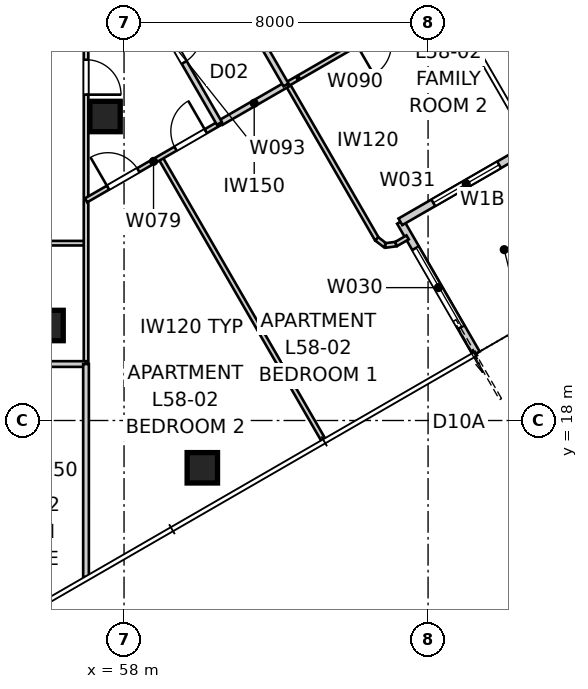
"""IFC4 building model, lengths in metres.
Left out: names, types, materials, properties, quantities, classifications, styles, units other than length and angle.
Written with IfcOpenShell. Run it as: python <this file> out.ifc"""

import sys

from ifc_helpers import new_model, si_unit, direction, frame, frame_2d, origin, origin_2d, place, context, subcontext, project, spatial, rectangle, extrude, element, fill, save


model = new_model("IFC4")
c1 = context("Model", 3, precision=1e-05, world=origin(), true_north=direction((0.0, 1.0)))
c2 = subcontext(c1, "Body", "Model", "MODEL_VIEW")
j1 = project(units=[si_unit("LENGTHUNIT", "METRE"), si_unit("PLANEANGLEUNIT", "RADIAN")], contexts=[c1])
p1 = place(None, origin())
s1 = spatial("IfcSite", under=j1, at=p1, CompositionType="ELEMENT")
p2 = place(p1, origin())
s2 = spatial("IfcBuilding", under=s1, at=p2, CompositionType="ELEMENT")
p3 = place(p2, frame((0.0, 0.0, 211.6)))
s3 = spatial("IfcBuildingStorey", under=s2, at=p3, CompositionType="ELEMENT", Elevation=211.6)
for number, where, z_axis, x_axis in (
    (1, (60.06, 16.755, 0.0), (0.0, 0.0, 1.0), (1.0, 0.0, 0.0)),
    (2, (57.5, 26.0, 0.0), (0.0, 0.0, 1.0), (1.0, 0.0, 0.0)),
    (3, (56.0, 20.5, 0.0), (0.0, 0.0, 1.0), (1.0, 0.0, 0.0)),
):
    element("IfcColumn", number, at=place(p3, frame(where, z_axis=z_axis, x_axis=x_axis)), inside=s3, PredefinedType="COLUMN", context=c2, shape_type="SweptSolid", body=[
        extrude(rectangle(XDim=0.8, YDim=0.8, at=origin_2d()), origin(), (0.0, 0.0, 1.0), 3.4),
    ])
p4 = place(p3, frame((67.271, 19.764, 0.0), z_axis=(0.0, 0.0, 1.0), x_axis=(-0.49999894854, 0.866026010844, 0.0)))
e4 = element("IfcWall", 4, at=p4, inside=s3, PredefinedType="SOLIDWALL", context=c2, shape_type="SweptSolid", body=[
    extrude(rectangle(XDim=4.0, YDim=0.2, at=frame_2d((2.0, 0.0))), origin(), (0.0, 0.0, 1.0), 3.25),
])
p5 = place(p4, frame((0.8, 0.0, 0.0)))
e5 = element("IfcOpeningElement", 5, at=p5, cuts=e4, PredefinedType="OPENING", context=c2, shape_type="SweptSolid", body=[
    extrude(rectangle(XDim=2.4, YDim=2.1, at=frame_2d((1.2, 1.05))), frame((0.0, 0.11, 0.0), z_axis=(0.0, -1.0, 0.0), x_axis=(1.0, 0.0, 0.0)), (0.0, 0.0, 1.0), 0.22),
])
p6 = place(p3, frame((65.271, 23.229, 0.0), z_axis=(0.0, 0.0, 1.0), x_axis=(0.866026010844, 0.49999894854, 0.0)))
e6 = element("IfcWall", 6, at=p6, inside=s3, PredefinedType="SOLIDWALL", context=c2, shape_type="SweptSolid", body=[
    extrude(rectangle(XDim=4.0, YDim=0.2, at=frame_2d((2.0, 0.0))), origin(), (0.0, 0.0, 1.0), 3.25),
])
p7 = place(p6, frame((1.0, 0.0, 0.45)))
e7 = element("IfcOpeningElement", 7, at=p7, cuts=e6, PredefinedType="OPENING", context=c2, shape_type="SweptSolid", body=[
    extrude(rectangle(XDim=2.0, YDim=1.8, at=frame_2d((1.0, 0.9))), frame((0.0, 0.11, 0.0), z_axis=(0.0, -1.0, 0.0), x_axis=(1.0, 0.0, 0.0)), (0.0, 0.0, 1.0), 0.22),
])
p8 = place(p3, frame((64.111, 33.239, 0.0), z_axis=(0.0, 0.0, 1.0), x_axis=(-0.866024069551, -0.500002310952, 0.0)))
e8 = element("IfcWall", 8, at=p8, inside=s3, PredefinedType="PARTITIONING", context=c2, shape_type="SweptSolid", body=[
    extrude(rectangle(XDim=10.95, YDim=0.25, at=frame_2d((5.475, 0.0))), origin(), (0.0, 0.0, 1.0), 3.25),
])
p9 = place(p3, frame((57.0, 22.667, 0.0), z_axis=(0.0, 0.0, 1.0), x_axis=(-1.0, 0.0, 0.0)))
e9 = element("IfcWall", 9, at=p9, inside=s3, PredefinedType="PARTITIONING", context=c2, shape_type="SweptSolid", body=[
    extrude(rectangle(XDim=4.9, YDim=0.12, at=frame_2d((2.45, 0.0))), origin(), (0.0, 0.0, 1.0), 3.25),
])
p10 = place(p9, frame((1.866, 0.0, 0.0)))
e10 = element("IfcOpeningElement", 10, at=p10, cuts=e9, PredefinedType="OPENING", context=c2, shape_type="SweptSolid", body=[
    extrude(rectangle(XDim=0.92, YDim=2.34, at=frame_2d((0.46, 1.17))), frame((0.0, 0.07, 0.0), z_axis=(0.0, -1.0, 0.0), x_axis=(1.0, 0.0, 0.0)), (0.0, 0.0, 1.0), 0.14),
])
p11 = place(p3, frame((57.0, 42.676, 0.0), z_axis=(0.0, 0.0, 1.0), x_axis=(0.0, -1.0, 0.0)))
e11 = element("IfcWall", 11, at=p11, inside=s3, PredefinedType="PARTITIONING", context=c2, shape_type="SweptSolid", body=[
    extrude(rectangle(XDim=23.19, YDim=0.12, at=frame_2d((11.595, 0.0))), origin(), (0.0, 0.0, 1.0), 2.55),
])
p12 = place(p11, frame((11.03, 0.0, 0.0)))
e12 = element("IfcOpeningElement", 12, at=p12, cuts=e11, PredefinedType="OPENING", context=c2, shape_type="SweptSolid", body=[
    extrude(rectangle(XDim=0.92, YDim=2.34, at=frame_2d((0.46, 1.17))), frame((0.0, 0.07, 0.0), z_axis=(0.0, -1.0, 0.0), x_axis=(1.0, 0.0, 0.0)), (0.0, 0.0, 1.0), 0.14),
])
p13 = place(p11, frame((15.181, 0.0, 0.0)))
e13 = element("IfcOpeningElement", 13, at=p13, cuts=e11, PredefinedType="OPENING", context=c2, shape_type="SweptSolid", body=[
    extrude(rectangle(XDim=0.92, YDim=2.34, at=frame_2d((0.46, 1.17))), frame((0.0, 0.07, 0.0), z_axis=(0.0, -1.0, 0.0), x_axis=(1.0, 0.0, 0.0)), (0.0, 0.0, 1.0), 0.14),
])
p14 = place(p3, frame((57.0, 19.486, 0.0), z_axis=(0.0, 0.0, 1.0), x_axis=(-1.0, 0.0, 0.0)))
e14 = element("IfcWall", 14, at=p14, inside=s3, PredefinedType="SOLIDWALL", context=c2, shape_type="SweptSolid", body=[
    extrude(rectangle(XDim=4.602, YDim=0.15, at=frame_2d((2.301, 0.0))), origin(), (0.0, 0.0, 1.0), 3.25),
])
p15 = place(p14, frame((1.841, 0.0, 0.0)))
e15 = element("IfcOpeningElement", 15, at=p15, cuts=e14, PredefinedType="OPENING", context=c2, shape_type="SweptSolid", body=[
    extrude(rectangle(XDim=0.92, YDim=2.1, at=frame_2d((0.46, 1.05))), frame((0.0, 0.085, 0.0), z_axis=(0.0, -1.0, 0.0), x_axis=(1.0, 0.0, 0.0)), (0.0, 0.0, 1.0), 0.17),
])
p16 = place(p3, frame((63.246, 17.487, 0.0), z_axis=(0.0, 0.0, 1.0), x_axis=(-0.49999898161, 0.866025991751, 0.0)))
e16 = element("IfcWall", 16, at=p16, inside=s3, PredefinedType="PARTITIONING", context=c2, shape_type="SweptSolid", body=[
    extrude(rectangle(XDim=8.585, YDim=0.12, at=frame_2d((4.292, 0.0))), origin(), (0.0, 0.0, 1.0), 3.25),
])
p17 = place(p3, frame((57.0, 23.793, 0.0), z_axis=(0.0, 0.0, 1.0), x_axis=(0.866007146345, 0.50003162148, 0.0)))
e17 = element("IfcWall", 17, at=p17, inside=s3, PredefinedType="PARTITIONING", context=c2, shape_type="SweptSolid", body=[
    extrude(rectangle(XDim=4.101, YDim=0.12, at=frame_2d((2.051, 0.0))), origin(), (0.0, 0.0, 1.0), 3.25),
])
p18 = place(p17, frame((0.668, 0.0, 0.0)))
e18 = element("IfcOpeningElement", 18, at=p18, cuts=e17, PredefinedType="OPENING", context=c2, shape_type="SweptSolid", body=[
    extrude(rectangle(XDim=0.92, YDim=2.34, at=frame_2d((0.46, 1.17))), frame((0.0, 0.07, 0.0), z_axis=(0.0, -1.0, 0.0), x_axis=(1.0, 0.0, 0.0)), (0.0, 0.0, 1.0), 0.14),
])
p19 = place(p17, frame((2.719, 0.0, 0.0)))
e19 = element("IfcOpeningElement", 19, at=p19, cuts=e17, PredefinedType="OPENING", context=c2, shape_type="SweptSolid", body=[
    extrude(rectangle(XDim=0.92, YDim=2.34, at=frame_2d((0.46, 1.17))), frame((0.0, 0.07, 0.0), z_axis=(0.0, -1.0, 0.0), x_axis=(1.0, 0.0, 0.0)), (0.0, 0.0, 1.0), 0.14),
])
p20 = place(p3, frame((62.299, 26.853, 0.0), z_axis=(0.0, 0.0, 1.0), x_axis=(0.500006955494, -0.866021387991, 0.0)))
e20 = element("IfcWall", 20, at=p20, inside=s3, PredefinedType="PARTITIONING", context=c2, shape_type="SweptSolid", body=[
    extrude(rectangle(XDim=4.705, YDim=0.12, at=frame_2d((2.352, 0.0))), origin(), (0.0, 0.0, 1.0), 3.25),
])
p21 = place(p3, frame((64.651, 22.778, 0.0), z_axis=(0.0, 0.0, 1.0), x_axis=(0.793231928283, -0.608919623557, 0.0)))
e21 = element("IfcWall", 21, at=p21, inside=s3, PredefinedType="PARTITIONING", context=c2, shape_type="SweptSolid", body=[
    extrude(rectangle(XDim=0.283, YDim=0.12, at=frame_2d((0.142, 0.0))), origin(), (0.0, 0.0, 1.0), 3.25),
])
p22 = place(p3, frame((64.876, 22.606, 0.0), z_axis=(0.0, 0.0, 1.0), x_axis=(0.991407364485, 0.130810693925, 0.0)))
e22 = element("IfcWall", 22, at=p22, inside=s3, PredefinedType="PARTITIONING", context=c2, shape_type="SweptSolid", body=[
    extrude(rectangle(XDim=0.284, YDim=0.12, at=frame_2d((0.142, 0.0))), origin(), (0.0, 0.0, 1.0), 3.25),
])
p23 = place(p3, frame((65.157, 22.643, 0.0), z_axis=(0.0, 0.0, 1.0), x_axis=(0.866058575552, 0.499942540411, 0.0)))
e23 = element("IfcWall", 23, at=p23, inside=s3, PredefinedType="PARTITIONING", context=c2, shape_type="SweptSolid", body=[
    extrude(rectangle(XDim=0.352, YDim=0.12, at=frame_2d((0.176, 0.0))), origin(), (0.0, 0.0, 1.0), 3.25),
])
p24 = place(p3, frame((60.552, 25.844, 0.0), z_axis=(0.0, 0.0, 1.0), x_axis=(0.866074730264, 0.499914554297, 0.0)))
e24 = element("IfcWall", 24, at=p24, inside=s3, PredefinedType="SOLIDWALL", context=c2, shape_type="SweptSolid", body=[
    extrude(rectangle(XDim=2.017, YDim=0.15, at=frame_2d((1.008, 0.0))), origin(), (0.0, 0.0, 1.0), 3.25),
])
p25 = place(p3, frame((57.0, 13.88, 0.0), z_axis=(0.0, 0.0, 1.0), x_axis=(4.3550213e-05, 0.999999999052, 0.0)))
e25 = element("IfcWall", 25, at=p25, inside=s3, PredefinedType="SOLIDWALL", context=c2, shape_type="SweptSolid", body=[
    extrude(rectangle(XDim=5.606, YDim=0.15, at=frame_2d((2.803, 0.0))), origin(), (0.0, 0.0, 1.0), 3.25),
])
p26 = place(p3, frame((62.555, 27.0, 0.0), z_axis=(0.0, 0.0, 1.0), x_axis=(-0.865896854829, -0.500222587251, 0.0)))
e26 = element("IfcWall", 26, at=p26, inside=s3, PredefinedType="PARTITIONING", context=c2, shape_type="SweptSolid", body=[
    extrude(rectangle(XDim=0.296, YDim=0.12, at=frame_2d((0.148, 0.0))), origin(), (0.0, 0.0, 1.0), 3.25),
])
p27 = place(p3, frame((66.388, 29.214, 0.0), z_axis=(0.0, 0.0, 1.0), x_axis=(-0.866032173762, -0.499988273872, 0.0)))
e27 = element("IfcWall", 27, at=p27, inside=s3, PredefinedType="PARTITIONING", context=c2, shape_type="SweptSolid", body=[
    extrude(rectangle(XDim=4.373, YDim=0.12, at=frame_2d((2.186, 0.0))), origin(), (0.0, 0.0, 1.0), 3.25),
])
p28 = place(p27, frame((1.706, 0.0, 0.0)))
e28 = element("IfcOpeningElement", 28, at=p28, cuts=e27, PredefinedType="OPENING", context=c2, shape_type="SweptSolid", body=[
    extrude(rectangle(XDim=0.92, YDim=2.34, at=frame_2d((0.46, 1.17))), frame((0.0, 0.07, 0.0), z_axis=(0.0, -1.0, 0.0), x_axis=(1.0, 0.0, 0.0)), (0.0, 0.0, 1.0), 0.14),
])
p29 = place(p3, frame((62.263, 26.832, 0.0), z_axis=(0.0, 0.0, 1.0), x_axis=(-0.499999662836, 0.866025598446, 0.0)))
e29 = element("IfcWall", 29, at=p29, inside=s3, PredefinedType="SOLIDWALL", context=c2, shape_type="SweptSolid", body=[
    extrude(rectangle(XDim=4.625, YDim=0.15, at=frame_2d((2.312, 0.0))), origin(), (0.0, 0.0, 1.0), 3.25),
])
p30 = place(p29, frame((1.853, 0.0, 0.0)))
e30 = element("IfcOpeningElement", 30, at=p30, cuts=e29, PredefinedType="OPENING", context=c2, shape_type="SweptSolid", body=[
    extrude(rectangle(XDim=0.92, YDim=2.34, at=frame_2d((0.46, 1.17))), frame((0.0, 0.085, 0.0), z_axis=(0.0, -1.0, 0.0), x_axis=(1.0, 0.0, 0.0)), (0.0, 0.0, 1.0), 0.17),
])
p31 = place(p3, frame((58.196, 29.824, 0.0), z_axis=(0.0, 0.0, 1.0), x_axis=(0.499999662836, -0.866025598446, 0.0)))
e31 = element("IfcWall", 31, at=p31, inside=s3, PredefinedType="SOLIDWALL", context=c2, shape_type="SweptSolid", body=[
    extrude(rectangle(XDim=4.625, YDim=0.15, at=frame_2d((2.312, 0.0))), origin(), (0.0, 0.0, 1.0), 3.25),
])
p32 = place(p31, frame((1.853, 0.0, 0.0)))
e32 = element("IfcOpeningElement", 32, at=p32, cuts=e31, PredefinedType="OPENING", context=c2, shape_type="SweptSolid", body=[
    extrude(rectangle(XDim=0.92, YDim=2.34, at=frame_2d((0.46, 1.17))), frame((0.0, 0.085, 0.0), z_axis=(0.0, -1.0, 0.0), x_axis=(1.0, 0.0, 0.0)), (0.0, 0.0, 1.0), 0.17),
])
p33 = place(p5, origin())
e33 = element("IfcDoor", 33, at=p33, inside=s3, OperationType="SLIDING_TO_LEFT", PredefinedType="DOOR", context=c2, shape_type="SweptSolid", body=[
    extrude(rectangle(XDim=2.4, YDim=2.1, at=frame_2d((1.2, 1.05))), frame((0.0, 0.025, 0.0), z_axis=(0.0, -1.0, 0.0), x_axis=(1.0, 0.0, 0.0)), (0.0, 0.0, 1.0), 0.05),
])
fill(e5, e33)
p34 = place(p7, origin())
e34 = element("IfcWindow", 34, at=p34, inside=s3, PartitioningType="SINGLE_PANEL", PredefinedType="WINDOW", context=c2, shape_type="SweptSolid", body=[
    extrude(rectangle(XDim=2.0, YDim=1.8, at=frame_2d((1.0, 0.9))), frame((0.0, 0.03, 0.0), z_axis=(0.0, -1.0, 0.0), x_axis=(1.0, 0.0, 0.0)), (0.0, 0.0, 1.0), 0.06),
])
fill(e7, e34)
p35 = place(p13, origin())
e35 = element("IfcDoor", 35, at=p35, inside=s3, OperationType="SINGLE_SWING_RIGHT", PredefinedType="DOOR", context=c2, shape_type="SweptSolid", body=[
    extrude(rectangle(XDim=0.92, YDim=2.34, at=frame_2d((0.46, 1.17))), frame((0.0, 0.025, 0.0), z_axis=(0.0, -1.0, 0.0), x_axis=(1.0, 0.0, 0.0)), (0.0, 0.0, 1.0), 0.05),
])
fill(e13, e35)
p36 = place(p32, origin())
e36 = element("IfcDoor", 36, at=p36, inside=s3, OperationType="SINGLE_SWING_LEFT", PredefinedType="DOOR", context=c2, shape_type="SweptSolid", body=[
    extrude(rectangle(XDim=0.92, YDim=2.34, at=frame_2d((0.46, 1.17))), frame((0.0, 0.025, 0.0), z_axis=(0.0, -1.0, 0.0), x_axis=(1.0, 0.0, 0.0)), (0.0, 0.0, 1.0), 0.05),
])
fill(e32, e36)
p37 = place(p18, origin())
e37 = element("IfcDoor", 37, at=p37, inside=s3, OperationType="SINGLE_SWING_LEFT", PredefinedType="DOOR", context=c2, shape_type="SweptSolid", body=[
    extrude(rectangle(XDim=0.92, YDim=2.34, at=frame_2d((0.46, 1.17))), frame((0.0, 0.025, 0.0), z_axis=(0.0, -1.0, 0.0), x_axis=(1.0, 0.0, 0.0)), (0.0, 0.0, 1.0), 0.05),
])
fill(e18, e37)
p38 = place(p19, origin())
e38 = element("IfcDoor", 38, at=p38, inside=s3, OperationType="SINGLE_SWING_RIGHT", PredefinedType="DOOR", context=c2, shape_type="SweptSolid", body=[
    extrude(rectangle(XDim=0.92, YDim=2.34, at=frame_2d((0.46, 1.17))), frame((0.0, 0.025, 0.0), z_axis=(0.0, -1.0, 0.0), x_axis=(1.0, 0.0, 0.0)), (0.0, 0.0, 1.0), 0.05),
])
fill(e19, e38)
save(model, sys.argv[1])
